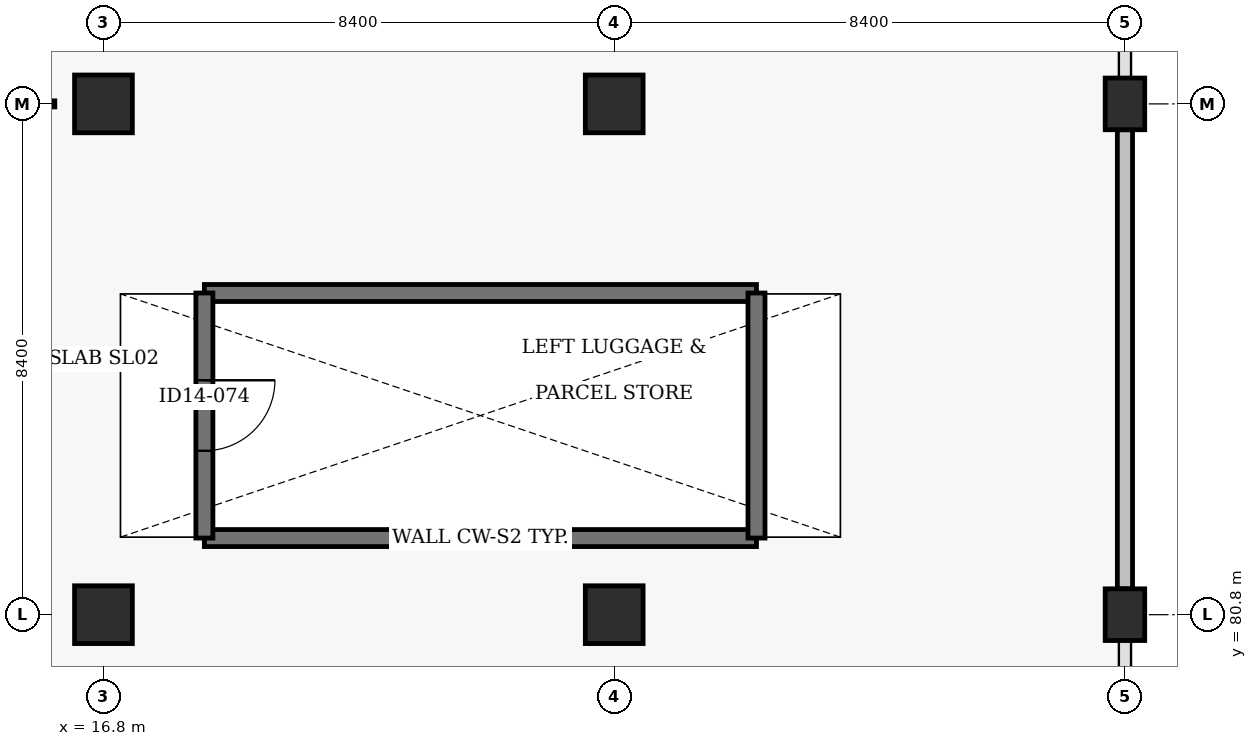
"""IFC4 building model, lengths in metres.
Left out: names, types, materials, properties, quantities, classifications, styles, units other than length and angle.
Written with IfcOpenShell. Run it as: python <this file> out.ifc"""

import sys

from ifc_helpers import new_model, si_unit, direction, frame, frame_2d, origin, origin_2d, place, context, subcontext, project, spatial, rectangle, circle, extrude, element, fill, save


model = new_model("IFC4")
c1 = context("Model", 3, precision=1e-05, world=origin(), true_north=direction((0.0, 1.0)))
c2 = subcontext(c1, "Body", "Model", "MODEL_VIEW")
j1 = project(units=[si_unit("LENGTHUNIT", "METRE"), si_unit("PLANEANGLEUNIT", "RADIAN")], contexts=[c1])
p1 = place(None, origin())
s1 = spatial("IfcSite", under=j1, at=p1, CompositionType="ELEMENT")
p2 = place(p1, origin())
s2 = spatial("IfcBuilding", under=s1, at=p2, CompositionType="ELEMENT")
p3 = place(p2, origin())
s3 = spatial("IfcBuildingStorey", under=s2, at=p3, CompositionType="ELEMENT", Elevation=0.0)
for number, where, z_axis, x_axis in (
    (1, (16.8, 80.8, -0.46), (0.0, 0.0, 1.0), (1.0, 0.0, 0.0)),
    (2, (16.8, 89.2, -0.46), (0.0, 0.0, 1.0), (1.0, 0.0, 0.0)),
    (3, (25.2, 80.8, -0.46), (0.0, 0.0, 1.0), (1.0, 0.0, 0.0)),
    (4, (25.2, 89.2, -0.46), (0.0, 0.0, 1.0), (1.0, 0.0, 0.0)),
):
    element("IfcColumn", number, at=place(p3, frame(where, z_axis=z_axis, x_axis=x_axis)), inside=s3, PredefinedType="COLUMN", context=c2, shape_type="SweptSolid", body=[
        extrude(circle(Radius=0.475, at=origin_2d()), origin(), (0.0, 0.0, 1.0), 5.9),
    ])
for number, where, z_axis, x_axis in (
    (5, (33.6, 80.8, -0.46), (0.0, 0.0, 1.0), (1.0, 0.0, 0.0)),
    (6, (33.6, 89.2, -0.46), (0.0, 0.0, 1.0), (1.0, 0.0, 0.0)),
):
    element("IfcColumn", number, at=place(p3, frame(where, z_axis=z_axis, x_axis=x_axis)), inside=s3, PredefinedType="COLUMN", context=c2, shape_type="SweptSolid", body=[
        extrude(rectangle(XDim=0.65, YDim=0.85, at=origin_2d()), origin(), (0.0, 0.0, 1.0), 5.9),
    ])
p4 = place(p3, frame((33.6, 81.225, 0.0), z_axis=(0.0, 0.0, 1.0), x_axis=(0.0, 1.0, 0.0)))
e7 = element("IfcWall", 7, at=p4, inside=s3, PredefinedType="SOLIDWALL", context=c2, shape_type="SweptSolid", body=[
    extrude(rectangle(XDim=7.55, YDim=0.25, at=frame_2d((3.775, 0.0))), origin(), (0.0, 0.0, 1.0), 4.795),
])
for number, where, z_axis, x_axis in (
    (8, (18.46, 82.06, 0.0), (0.0, 0.0, 1.0), (1.0, 0.0, 0.0)),
    (9, (18.46, 86.09, 0.0), (0.0, 0.0, 1.0), (1.0, 0.0, 0.0)),
):
    element("IfcWall", number, at=place(p3, frame(where, z_axis=z_axis, x_axis=x_axis)), inside=s3, PredefinedType="SHEAR", context=c2, shape_type="SweptSolid", body=[
        extrude(rectangle(XDim=9.08, YDim=0.28, at=frame_2d((4.54, 0.0))), origin(), (0.0, 0.0, 1.0), 5.44),
    ])
p5 = place(p3, frame((18.46, 86.09, 0.0), z_axis=(0.0, 0.0, 1.0), x_axis=(0.0, -1.0, 0.0)))
e10 = element("IfcWall", 10, at=p5, inside=s3, PredefinedType="SHEAR", context=c2, shape_type="SweptSolid", body=[
    extrude(rectangle(XDim=4.03, YDim=0.28, at=frame_2d((2.015, 0.0))), origin(), (0.0, 0.0, 1.0), 5.44),
])
p6 = place(p5, frame((1.435, 0.0, 0.0)))
e11 = element("IfcOpeningElement", 11, at=p6, cuts=e10, PredefinedType="OPENING", context=c2, shape_type="SweptSolid", body=[
    extrude(rectangle(XDim=1.16, YDim=2.14, at=frame_2d((0.58, 1.07))), frame((0.0, 0.15, 0.0), z_axis=(0.0, -1.0, 0.0), x_axis=(1.0, 0.0, 0.0)), (0.0, 0.0, 1.0), 0.3),
])
p7 = place(p3, frame((27.54, 82.06, 0.0), z_axis=(0.0, 0.0, 1.0), x_axis=(0.0, 1.0, 0.0)))
e12 = element("IfcWall", 12, at=p7, inside=s3, PredefinedType="SHEAR", context=c2, shape_type="SweptSolid", body=[
    extrude(rectangle(XDim=4.03, YDim=0.28, at=frame_2d((2.015, 0.0))), origin(), (0.0, 0.0, 1.0), 5.44),
])
p8 = place(p3, frame((0.8, 89.2, 0.0), z_axis=(0.0, 0.0, 1.0), x_axis=(1.0, 0.0, 0.0)))
e13 = element("IfcWall", 13, at=p8, inside=s3, PredefinedType="PARTITIONING", context=c2, shape_type="SweptSolid", body=[
    extrude(rectangle(XDim=15.2, YDim=0.1, at=frame_2d((7.6, 0.0))), origin(), (0.0, 0.0, 1.0), 3.0),
])
p9 = place(p8, frame((2.2, 0.0, 0.0)))
e14 = element("IfcOpeningElement", 14, at=p9, cuts=e13, PredefinedType="OPENING", context=c2, shape_type="SweptSolid", body=[
    extrude(rectangle(XDim=1.06, YDim=2.1, at=frame_2d((0.53, 1.05))), frame((0.0, 0.06, 0.0), z_axis=(0.0, -1.0, 0.0), x_axis=(1.0, 0.0, 0.0)), (0.0, 0.0, 1.0), 0.12),
])
p10 = place(p6, origin())
e15 = element("IfcDoor", 15, at=p10, inside=s3, OperationType="SINGLE_SWING_LEFT", PredefinedType="DOOR", context=c2, shape_type="SweptSolid", body=[
    extrude(rectangle(XDim=1.16, YDim=2.14, at=frame_2d((0.58, 1.07))), frame((0.0, 0.025, 0.0), z_axis=(0.0, -1.0, 0.0), x_axis=(1.0, 0.0, 0.0)), (0.0, 0.0, 1.0), 0.05),
])
fill(e11, e15)
save(model, sys.argv[1])
